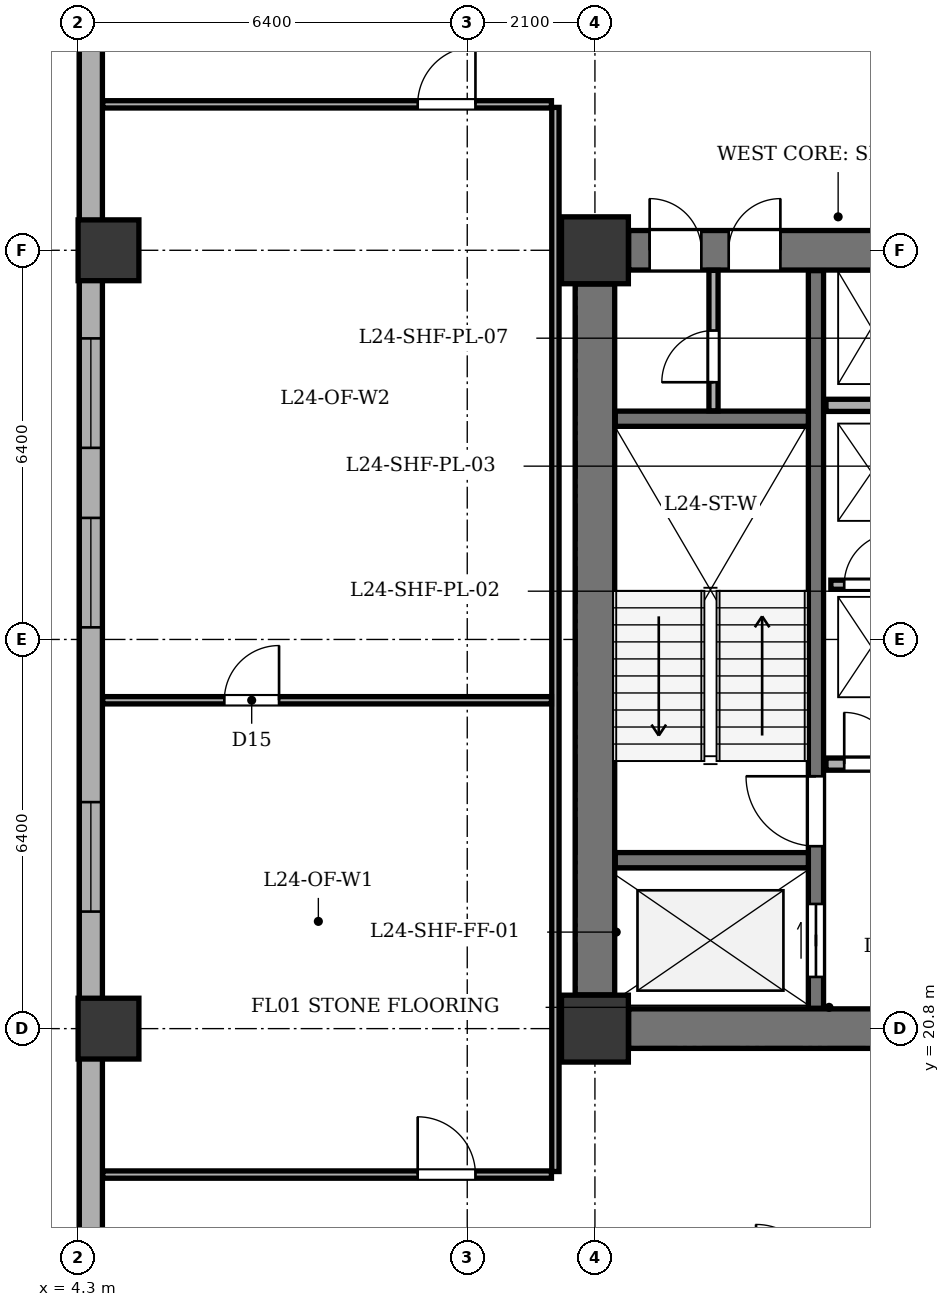
"""IFC4 building model, lengths in metres.
Left out: names, types, materials, properties, quantities, classifications, styles, units other than length and angle.
Written with IfcOpenShell. Run it as: python <this file> out.ifc"""

import sys

from ifc_helpers import new_model, si_unit, direction, frame, frame_2d, origin, origin_2d, place, context, subcontext, project, spatial, rectangle, extrude, element, fill, save


model = new_model("IFC4")
c1 = context("Model", 3, precision=1e-05, world=origin(), true_north=direction((0.0, 1.0)))
c2 = subcontext(c1, "Body", "Model", "MODEL_VIEW")
j1 = project(units=[si_unit("LENGTHUNIT", "METRE"), si_unit("PLANEANGLEUNIT", "RADIAN")], contexts=[c1])
p1 = place(None, origin())
s1 = spatial("IfcSite", under=j1, at=p1, CompositionType="ELEMENT")
p2 = place(p1, origin())
s2 = spatial("IfcBuilding", under=s1, at=p2, CompositionType="ELEMENT")
p3 = place(p2, frame((0.0, 0.0, 98.4)))
s3 = spatial("IfcBuildingStorey", under=s2, at=p3, CompositionType="ELEMENT", Elevation=98.4)
for number, where, z_axis, x_axis in (
    (1, (12.8, 20.8, 0.0), (0.0, 0.0, 1.0), (1.0, 0.0, 0.0)),
    (2, (12.8, 33.6, 0.0), (0.0, 0.0, 1.0), (1.0, 0.0, 0.0)),
):
    element("IfcColumn", number, at=place(p3, frame(where, z_axis=z_axis, x_axis=x_axis)), inside=s3, PredefinedType="COLUMN", context=c2, shape_type="SweptSolid", body=[
        extrude(rectangle(XDim=1.1, YDim=1.1, at=origin_2d()), origin(), (0.0, 0.0, 1.0), 3.9),
    ])
for number, where, z_axis, x_axis in (
    (3, (4.8, 20.8, 0.0), (0.0, 0.0, 1.0), (1.0, 0.0, 0.0)),
    (4, (4.8, 33.6, 0.0), (0.0, 0.0, 1.0), (1.0, 0.0, 0.0)),
):
    element("IfcColumn", number, at=place(p3, frame(where, z_axis=z_axis, x_axis=x_axis)), inside=s3, PredefinedType="COLUMN", context=c2, shape_type="SweptSolid", body=[
        extrude(rectangle(XDim=1.0, YDim=1.0, at=origin_2d()), origin(), (0.0, 0.0, 1.0), 3.9),
    ])
p4 = place(p3, frame((4.51, 12.9, 0.0), z_axis=(0.0, 0.0, 1.0), x_axis=(0.0, 1.0, 0.0)))
e5 = element("IfcWall", 5, at=p4, inside=s3, PredefinedType="STANDARD", context=c2, shape_type="SweptSolid", body=[
    extrude(rectangle(XDim=35.0, YDim=0.38, at=frame_2d((17.5, 0.0))), origin(), (0.0, 0.0, 1.0), 3.135),
])
p5 = place(p4, frame((2.025, 0.0, 0.8)))
e6 = element("IfcOpeningElement", 6, at=p5, cuts=e5, PredefinedType="OPENING", context=c2, shape_type="SweptSolid", body=[
    extrude(rectangle(XDim=1.8, YDim=1.9, at=frame_2d((0.9, 0.95))), frame((0.0, 0.2, 0.0), z_axis=(0.0, -1.0, 0.0), x_axis=(1.0, 0.0, 0.0)), (0.0, 0.0, 1.0), 0.4),
])
p6 = place(p4, frame((9.825, 0.0, 0.8)))
e7 = element("IfcOpeningElement", 7, at=p6, cuts=e5, PredefinedType="OPENING", context=c2, shape_type="SweptSolid", body=[
    extrude(rectangle(XDim=1.8, YDim=1.9, at=frame_2d((0.9, 0.95))), frame((0.0, 0.2, 0.0), z_axis=(0.0, -1.0, 0.0), x_axis=(1.0, 0.0, 0.0)), (0.0, 0.0, 1.0), 0.4),
])
p7 = place(p4, frame((14.499, 0.0, 0.8)))
e8 = element("IfcOpeningElement", 8, at=p7, cuts=e5, PredefinedType="OPENING", context=c2, shape_type="SweptSolid", body=[
    extrude(rectangle(XDim=1.8, YDim=1.9, at=frame_2d((0.9, 0.95))), frame((0.0, 0.2, 0.0), z_axis=(0.0, -1.0, 0.0), x_axis=(1.0, 0.0, 0.0)), (0.0, 0.0, 1.0), 0.4),
])
p8 = place(p4, frame((17.451, 0.0, 0.8)))
e9 = element("IfcOpeningElement", 9, at=p8, cuts=e5, PredefinedType="OPENING", context=c2, shape_type="SweptSolid", body=[
    extrude(rectangle(XDim=1.8, YDim=1.9, at=frame_2d((0.9, 0.95))), frame((0.0, 0.2, 0.0), z_axis=(0.0, -1.0, 0.0), x_axis=(1.0, 0.0, 0.0)), (0.0, 0.0, 1.0), 0.4),
])
p9 = place(p4, frame((25.443, 0.0, 0.8)))
e10 = element("IfcOpeningElement", 10, at=p9, cuts=e5, PredefinedType="OPENING", context=c2, shape_type="SweptSolid", body=[
    extrude(rectangle(XDim=1.8, YDim=1.9, at=frame_2d((0.9, 0.95))), frame((0.0, 0.2, 0.0), z_axis=(0.0, -1.0, 0.0), x_axis=(1.0, 0.0, 0.0)), (0.0, 0.0, 1.0), 0.4),
])
p10 = place(p4, frame((30.207, 0.0, 0.8)))
e11 = element("IfcOpeningElement", 11, at=p10, cuts=e5, PredefinedType="OPENING", context=c2, shape_type="SweptSolid", body=[
    extrude(rectangle(XDim=2.4, YDim=1.9, at=frame_2d((1.2, 0.95))), frame((0.0, 0.2, 0.0), z_axis=(0.0, -1.0, 0.0), x_axis=(1.0, 0.0, 0.0)), (0.0, 0.0, 1.0), 0.4),
])
p11 = place(p3, frame((12.8, 21.355, 0.0), z_axis=(0.0, 0.0, 1.0), x_axis=(0.0, 1.0, 0.0)))
e12 = element("IfcWall", 12, at=p11, inside=s3, PredefinedType="SHEAR", context=c2, shape_type="SweptSolid", body=[
    extrude(rectangle(XDim=11.69, YDim=0.65, at=frame_2d((5.845, 0.0))), origin(), (0.0, 0.0, 1.0), 3.6),
])
p12 = place(p3, frame((13.355, 20.8, 0.0), z_axis=(0.0, 0.0, 1.0), x_axis=(1.0, 0.0, 0.0)))
e13 = element("IfcWall", 13, at=p12, inside=s3, PredefinedType="SHEAR", context=c2, shape_type="SweptSolid", body=[
    extrude(rectangle(XDim=6.89, YDim=0.65, at=frame_2d((3.445, 0.0))), origin(), (0.0, 0.0, 1.0), 3.6),
])
p13 = place(p3, frame((13.355, 33.6, 0.0), z_axis=(0.0, 0.0, 1.0), x_axis=(1.0, 0.0, 0.0)))
e14 = element("IfcWall", 14, at=p13, inside=s3, PredefinedType="SHEAR", context=c2, shape_type="SweptSolid", body=[
    extrude(rectangle(XDim=6.89, YDim=0.65, at=frame_2d((3.445, 0.0))), origin(), (0.0, 0.0, 1.0), 3.6),
])
p14 = place(p13, frame((0.345, 0.0, 0.0)))
e15 = element("IfcOpeningElement", 15, at=p14, cuts=e14, PredefinedType="OPENING", context=c2, shape_type="SweptSolid", body=[
    extrude(rectangle(XDim=0.85, YDim=2.02, at=frame_2d((0.425, 1.01))), frame((0.0, 0.335, 0.0), z_axis=(0.0, -1.0, 0.0), x_axis=(1.0, 0.0, 0.0)), (0.0, 0.0, 1.0), 0.67),
])
p15 = place(p13, frame((1.645, 0.0, 0.0)))
e16 = element("IfcOpeningElement", 16, at=p15, cuts=e14, PredefinedType="OPENING", context=c2, shape_type="SweptSolid", body=[
    extrude(rectangle(XDim=0.85, YDim=2.02, at=frame_2d((0.425, 1.01))), frame((0.0, 0.335, 0.0), z_axis=(0.0, -1.0, 0.0), x_axis=(1.0, 0.0, 0.0)), (0.0, 0.0, 1.0), 0.67),
])
p16 = place(p3, frame((16.435, 21.135, 0.0), z_axis=(0.0, 0.0, 1.0), x_axis=(0.0, 1.0, 0.0)))
e17 = element("IfcWall", 17, at=p16, inside=s3, PredefinedType="SHEAR", context=c2, shape_type="SweptSolid", body=[
    extrude(rectangle(XDim=12.13, YDim=0.25, at=frame_2d((6.065, 0.0))), origin(), (0.0, 0.0, 1.0), 3.6),
])
p17 = place(p16, frame((0.515, 0.0, 0.0)))
e18 = element("IfcOpeningElement", 18, at=p17, cuts=e17, PredefinedType="OPENING", context=c2, shape_type="SweptSolid", body=[
    extrude(rectangle(XDim=1.2, YDim=2.15, at=frame_2d((0.6, 1.075))), frame((0.0, 0.135, 0.0), z_axis=(0.0, -1.0, 0.0), x_axis=(1.0, 0.0, 0.0)), (0.0, 0.0, 1.0), 0.27),
])
p18 = place(p16, frame((2.665, 0.0, 0.0)))
e19 = element("IfcOpeningElement", 19, at=p18, cuts=e17, PredefinedType="OPENING", context=c2, shape_type="SweptSolid", body=[
    extrude(rectangle(XDim=1.15, YDim=2.15, at=frame_2d((0.575, 1.075))), frame((0.0, 0.135, 0.0), z_axis=(0.0, -1.0, 0.0), x_axis=(1.0, 0.0, 0.0)), (0.0, 0.0, 1.0), 0.27),
])
for number, where, z_axis, x_axis in (
    (20, (13.135, 23.57, 0.0), (0.0, 0.0, 1.0), (1.0, 0.0, 0.0)),
    (21, (13.135, 30.83, 0.0), (0.0, 0.0, 1.0), (1.0, 0.0, 0.0)),
):
    element("IfcWall", number, at=place(p3, frame(where, z_axis=z_axis, x_axis=x_axis)), inside=s3, PredefinedType="SHEAR", context=c2, shape_type="SweptSolid", body=[
        extrude(rectangle(XDim=3.175, YDim=0.25, at=frame_2d((1.587, 0.0))), origin(), (0.0, 0.0, 1.0), 3.6),
    ])
p19 = place(p3, frame((16.6, 25.15, 0.0), z_axis=(0.0, 0.0, 1.0), x_axis=(1.0, 0.0, 0.0)))
e22 = element("IfcWall", 22, at=p19, inside=s3, PredefinedType="SOLIDWALL", context=c2, shape_type="SweptSolid", body=[
    extrude(rectangle(XDim=3.865, YDim=0.2, at=frame_2d((1.933, 0.0))), origin(), (0.0, 0.0, 1.0), 3.6),
])
p20 = place(p19, frame((0.3, 0.0, 0.0)))
e23 = element("IfcOpeningElement", 23, at=p20, cuts=e22, PredefinedType="OPENING", context=c2, shape_type="SweptSolid", body=[
    extrude(rectangle(XDim=0.85, YDim=2.02, at=frame_2d((0.425, 1.01))), frame((0.0, 0.11, 0.0), z_axis=(0.0, -1.0, 0.0), x_axis=(1.0, 0.0, 0.0)), (0.0, 0.0, 1.0), 0.22),
])
p21 = place(p3, frame((16.6, 31.05, 0.0), z_axis=(0.0, 0.0, 1.0), x_axis=(1.0, 0.0, 0.0)))
e24 = element("IfcWall", 24, at=p21, inside=s3, PredefinedType="SOLIDWALL", context=c2, shape_type="SweptSolid", body=[
    extrude(rectangle(XDim=3.85, YDim=0.2, at=frame_2d((1.925, 0.0))), origin(), (0.0, 0.0, 1.0), 3.6),
])
p22 = place(p3, frame((14.75, 30.96, 0.0), z_axis=(0.0, 0.0, 1.0), x_axis=(0.0, 1.0, 0.0)))
e25 = element("IfcWall", 25, at=p22, inside=s3, PredefinedType="PARTITIONING", context=c2, shape_type="SweptSolid", body=[
    extrude(rectangle(XDim=2.31, YDim=0.15, at=frame_2d((1.155, 0.0))), origin(), (0.0, 0.0, 1.0), 3.6),
])
p23 = place(p22, frame((0.47, 0.0, 0.0)))
e26 = element("IfcOpeningElement", 26, at=p23, cuts=e25, PredefinedType="OPENING", context=c2, shape_type="SweptSolid", body=[
    extrude(rectangle(XDim=0.85, YDim=2.02, at=frame_2d((0.425, 1.01))), frame((0.0, 0.085, 0.0), z_axis=(0.0, -1.0, 0.0), x_axis=(1.0, 0.0, 0.0)), (0.0, 0.0, 1.0), 0.17),
])
p24 = place(p3, frame((16.68, 28.1, 0.0), z_axis=(0.0, 0.0, 1.0), x_axis=(1.0, 0.0, 0.0)))
e27 = element("IfcWall", 27, at=p24, inside=s3, PredefinedType="PARTITIONING", context=c2, shape_type="SweptSolid", body=[
    extrude(rectangle(XDim=1.32, YDim=0.15, at=frame_2d((0.66, 0.0))), origin(), (0.0, 0.0, 1.0), 3.6),
])
p25 = place(p24, frame((0.22, 0.0, 0.0)))
e28 = element("IfcOpeningElement", 28, at=p25, cuts=e27, PredefinedType="OPENING", context=c2, shape_type="SweptSolid", body=[
    extrude(rectangle(XDim=0.85, YDim=2.02, at=frame_2d((0.425, 1.01))), frame((0.0, 0.085, 0.0), z_axis=(0.0, -1.0, 0.0), x_axis=(1.0, 0.0, 0.0)), (0.0, 0.0, 1.0), 0.17),
])
p26 = place(p3, frame((12.15, 18.45, 0.0), z_axis=(0.0, 0.0, 1.0), x_axis=(0.0, 1.0, 0.0)))
e29 = element("IfcWall", 29, at=p26, inside=s3, PredefinedType="PARTITIONING", context=c2, shape_type="SweptSolid", body=[
    extrude(rectangle(XDim=17.5, YDim=0.12, at=frame_2d((8.75, 0.0))), origin(), (0.0, 0.0, 1.0), 3.6),
])
p27 = place(p3, frame((4.705, 18.4, 0.0), z_axis=(0.0, 0.0, 1.0), x_axis=(1.0, 0.0, 0.0)))
e30 = element("IfcWall", 30, at=p27, inside=s3, PredefinedType="PARTITIONING", context=c2, shape_type="SweptSolid", body=[
    extrude(rectangle(XDim=7.38, YDim=0.12, at=frame_2d((3.69, 0.0))), origin(), (0.0, 0.0, 1.0), 3.6),
])
p28 = place(p27, frame((5.18, 0.0, 0.0)))
e31 = element("IfcOpeningElement", 31, at=p28, cuts=e30, PredefinedType="OPENING", context=c2, shape_type="SweptSolid", body=[
    extrude(rectangle(XDim=0.95, YDim=2.1, at=frame_2d((0.475, 1.05))), frame((0.0, 0.07, 0.0), z_axis=(0.0, -1.0, 0.0), x_axis=(1.0, 0.0, 0.0)), (0.0, 0.0, 1.0), 0.14),
])
p29 = place(p3, frame((4.705, 36.0, 0.0), z_axis=(0.0, 0.0, 1.0), x_axis=(1.0, 0.0, 0.0)))
e32 = element("IfcWall", 32, at=p29, inside=s3, PredefinedType="PARTITIONING", context=c2, shape_type="SweptSolid", body=[
    extrude(rectangle(XDim=7.38, YDim=0.12, at=frame_2d((3.69, 0.0))), origin(), (0.0, 0.0, 1.0), 3.6),
])
p30 = place(p29, frame((5.18, 0.0, 0.0)))
e33 = element("IfcOpeningElement", 33, at=p30, cuts=e32, PredefinedType="OPENING", context=c2, shape_type="SweptSolid", body=[
    extrude(rectangle(XDim=0.95, YDim=2.1, at=frame_2d((0.475, 1.05))), frame((0.0, 0.07, 0.0), z_axis=(0.0, -1.0, 0.0), x_axis=(1.0, 0.0, 0.0)), (0.0, 0.0, 1.0), 0.14),
])
p31 = place(p3, frame((4.705, 26.2, 0.0), z_axis=(0.0, 0.0, 1.0), x_axis=(1.0, 0.0, 0.0)))
e34 = element("IfcWall", 34, at=p31, inside=s3, PredefinedType="PARTITIONING", context=c2, shape_type="SweptSolid", body=[
    extrude(rectangle(XDim=7.38, YDim=0.12, at=frame_2d((3.69, 0.0))), origin(), (0.0, 0.0, 1.0), 3.6),
])
p32 = place(p31, frame((2.0, 0.0, 0.0)))
e35 = element("IfcOpeningElement", 35, at=p32, cuts=e34, PredefinedType="OPENING", context=c2, shape_type="SweptSolid", body=[
    extrude(rectangle(XDim=0.9, YDim=2.05, at=frame_2d((0.45, 1.025))), frame((0.0, 0.07, 0.0), z_axis=(0.0, -1.0, 0.0), x_axis=(1.0, 0.0, 0.0)), (0.0, 0.0, 1.0), 0.14),
])
p33 = place(p6, origin())
e36 = element("IfcWindow", 36, at=p33, inside=s3, PartitioningType="SINGLE_PANEL", PredefinedType="WINDOW", context=c2, shape_type="SweptSolid", body=[
    extrude(rectangle(XDim=1.8, YDim=1.9, at=frame_2d((0.9, 0.95))), frame((0.0, -0.01, 0.0), z_axis=(0.0, -1.0, 0.0), x_axis=(1.0, 0.0, 0.0)), (0.0, 0.0, 1.0), 0.06),
])
fill(e7, e36)
p34 = place(p7, origin())
e37 = element("IfcWindow", 37, at=p34, inside=s3, PartitioningType="SINGLE_PANEL", PredefinedType="WINDOW", context=c2, shape_type="SweptSolid", body=[
    extrude(rectangle(XDim=1.8, YDim=1.9, at=frame_2d((0.9, 0.95))), frame((0.0, -0.01, 0.0), z_axis=(0.0, -1.0, 0.0), x_axis=(1.0, 0.0, 0.0)), (0.0, 0.0, 1.0), 0.06),
])
fill(e8, e37)
p35 = place(p8, origin())
e38 = element("IfcWindow", 38, at=p35, inside=s3, PartitioningType="SINGLE_PANEL", PredefinedType="WINDOW", context=c2, shape_type="SweptSolid", body=[
    extrude(rectangle(XDim=1.8, YDim=1.9, at=frame_2d((0.9, 0.95))), frame((0.0, -0.01, 0.0), z_axis=(0.0, -1.0, 0.0), x_axis=(1.0, 0.0, 0.0)), (0.0, 0.0, 1.0), 0.06),
])
fill(e9, e38)
p36 = place(p14, origin())
e39 = element("IfcDoor", 39, at=p36, inside=s3, OperationType="SINGLE_SWING_LEFT", PredefinedType="DOOR", context=c2, shape_type="SweptSolid", body=[
    extrude(rectangle(XDim=0.85, YDim=2.02, at=frame_2d((0.425, 1.01))), frame((0.0, 0.025, 0.0), z_axis=(0.0, -1.0, 0.0), x_axis=(1.0, 0.0, 0.0)), (0.0, 0.0, 1.0), 0.05),
])
fill(e15, e39)
p37 = place(p15, origin())
e40 = element("IfcDoor", 40, at=p37, inside=s3, OperationType="SINGLE_SWING_RIGHT", PredefinedType="DOOR", context=c2, shape_type="SweptSolid", body=[
    extrude(rectangle(XDim=0.85, YDim=2.02, at=frame_2d((0.425, 1.01))), frame((0.0, 0.025, 0.0), z_axis=(0.0, -1.0, 0.0), x_axis=(1.0, 0.0, 0.0)), (0.0, 0.0, 1.0), 0.05),
])
fill(e16, e40)
p38 = place(p17, origin())
e41 = element("IfcDoor", 41, at=p38, inside=s3, OperationType="DOUBLE_DOOR_SLIDING", PredefinedType="DOOR", context=c2, shape_type="SweptSolid", body=[
    extrude(rectangle(XDim=1.2, YDim=2.15, at=frame_2d((0.6, 1.075))), frame((0.0, 0.025, 0.0), z_axis=(0.0, -1.0, 0.0), x_axis=(1.0, 0.0, 0.0)), (0.0, 0.0, 1.0), 0.05),
])
fill(e18, e41)
p39 = place(p18, origin())
e42 = element("IfcDoor", 42, at=p39, inside=s3, OperationType="SINGLE_SWING_RIGHT", PredefinedType="DOOR", context=c2, shape_type="SweptSolid", body=[
    extrude(rectangle(XDim=1.15, YDim=2.15, at=frame_2d((0.575, 1.075))), frame((0.0, 0.025, 0.0), z_axis=(0.0, -1.0, 0.0), x_axis=(1.0, 0.0, 0.0)), (0.0, 0.0, 1.0), 0.05),
])
fill(e19, e42)
p40 = place(p20, origin())
e43 = element("IfcDoor", 43, at=p40, inside=s3, OperationType="SINGLE_SWING_LEFT", PredefinedType="DOOR", context=c2, shape_type="SweptSolid", body=[
    extrude(rectangle(XDim=0.85, YDim=2.02, at=frame_2d((0.425, 1.01))), frame((0.0, 0.025, 0.0), z_axis=(0.0, -1.0, 0.0), x_axis=(1.0, 0.0, 0.0)), (0.0, 0.0, 1.0), 0.05),
])
fill(e23, e43)
p41 = place(p23, origin())
e44 = element("IfcDoor", 44, at=p41, inside=s3, OperationType="SINGLE_SWING_LEFT", PredefinedType="DOOR", context=c2, shape_type="SweptSolid", body=[
    extrude(rectangle(XDim=0.85, YDim=2.02, at=frame_2d((0.425, 1.01))), frame((0.0, 0.025, 0.0), z_axis=(0.0, -1.0, 0.0), x_axis=(1.0, 0.0, 0.0)), (0.0, 0.0, 1.0), 0.05),
])
fill(e26, e44)
p42 = place(p25, origin())
e45 = element("IfcDoor", 45, at=p42, inside=s3, OperationType="SINGLE_SWING_RIGHT", PredefinedType="DOOR", context=c2, shape_type="SweptSolid", body=[
    extrude(rectangle(XDim=0.85, YDim=2.02, at=frame_2d((0.425, 1.01))), frame((0.0, 0.025, 0.0), z_axis=(0.0, -1.0, 0.0), x_axis=(1.0, 0.0, 0.0)), (0.0, 0.0, 1.0), 0.05),
])
fill(e28, e45)
p43 = place(p32, origin())
e46 = element("IfcDoor", 46, at=p43, inside=s3, OperationType="SINGLE_SWING_RIGHT", PredefinedType="DOOR", context=c2, shape_type="SweptSolid", body=[
    extrude(rectangle(XDim=0.9, YDim=2.05, at=frame_2d((0.45, 1.025))), frame((0.0, 0.025, 0.0), z_axis=(0.0, -1.0, 0.0), x_axis=(1.0, 0.0, 0.0)), (0.0, 0.0, 1.0), 0.05),
])
fill(e35, e46)
p44 = place(p28, origin())
e47 = element("IfcDoor", 47, at=p44, inside=s3, OperationType="SINGLE_SWING_LEFT", PredefinedType="DOOR", context=c2, shape_type="SweptSolid", body=[
    extrude(rectangle(XDim=0.95, YDim=2.1, at=frame_2d((0.475, 1.05))), frame((0.0, 0.025, 0.0), z_axis=(0.0, -1.0, 0.0), x_axis=(1.0, 0.0, 0.0)), (0.0, 0.0, 1.0), 0.05),
])
fill(e31, e47)
p45 = place(p30, origin())
e48 = element("IfcDoor", 48, at=p45, inside=s3, OperationType="SINGLE_SWING_RIGHT", PredefinedType="DOOR", context=c2, shape_type="SweptSolid", body=[
    extrude(rectangle(XDim=0.95, YDim=2.1, at=frame_2d((0.475, 1.05))), frame((0.0, 0.025, 0.0), z_axis=(0.0, -1.0, 0.0), x_axis=(1.0, 0.0, 0.0)), (0.0, 0.0, 1.0), 0.05),
])
fill(e33, e48)
save(model, sys.argv[1])
